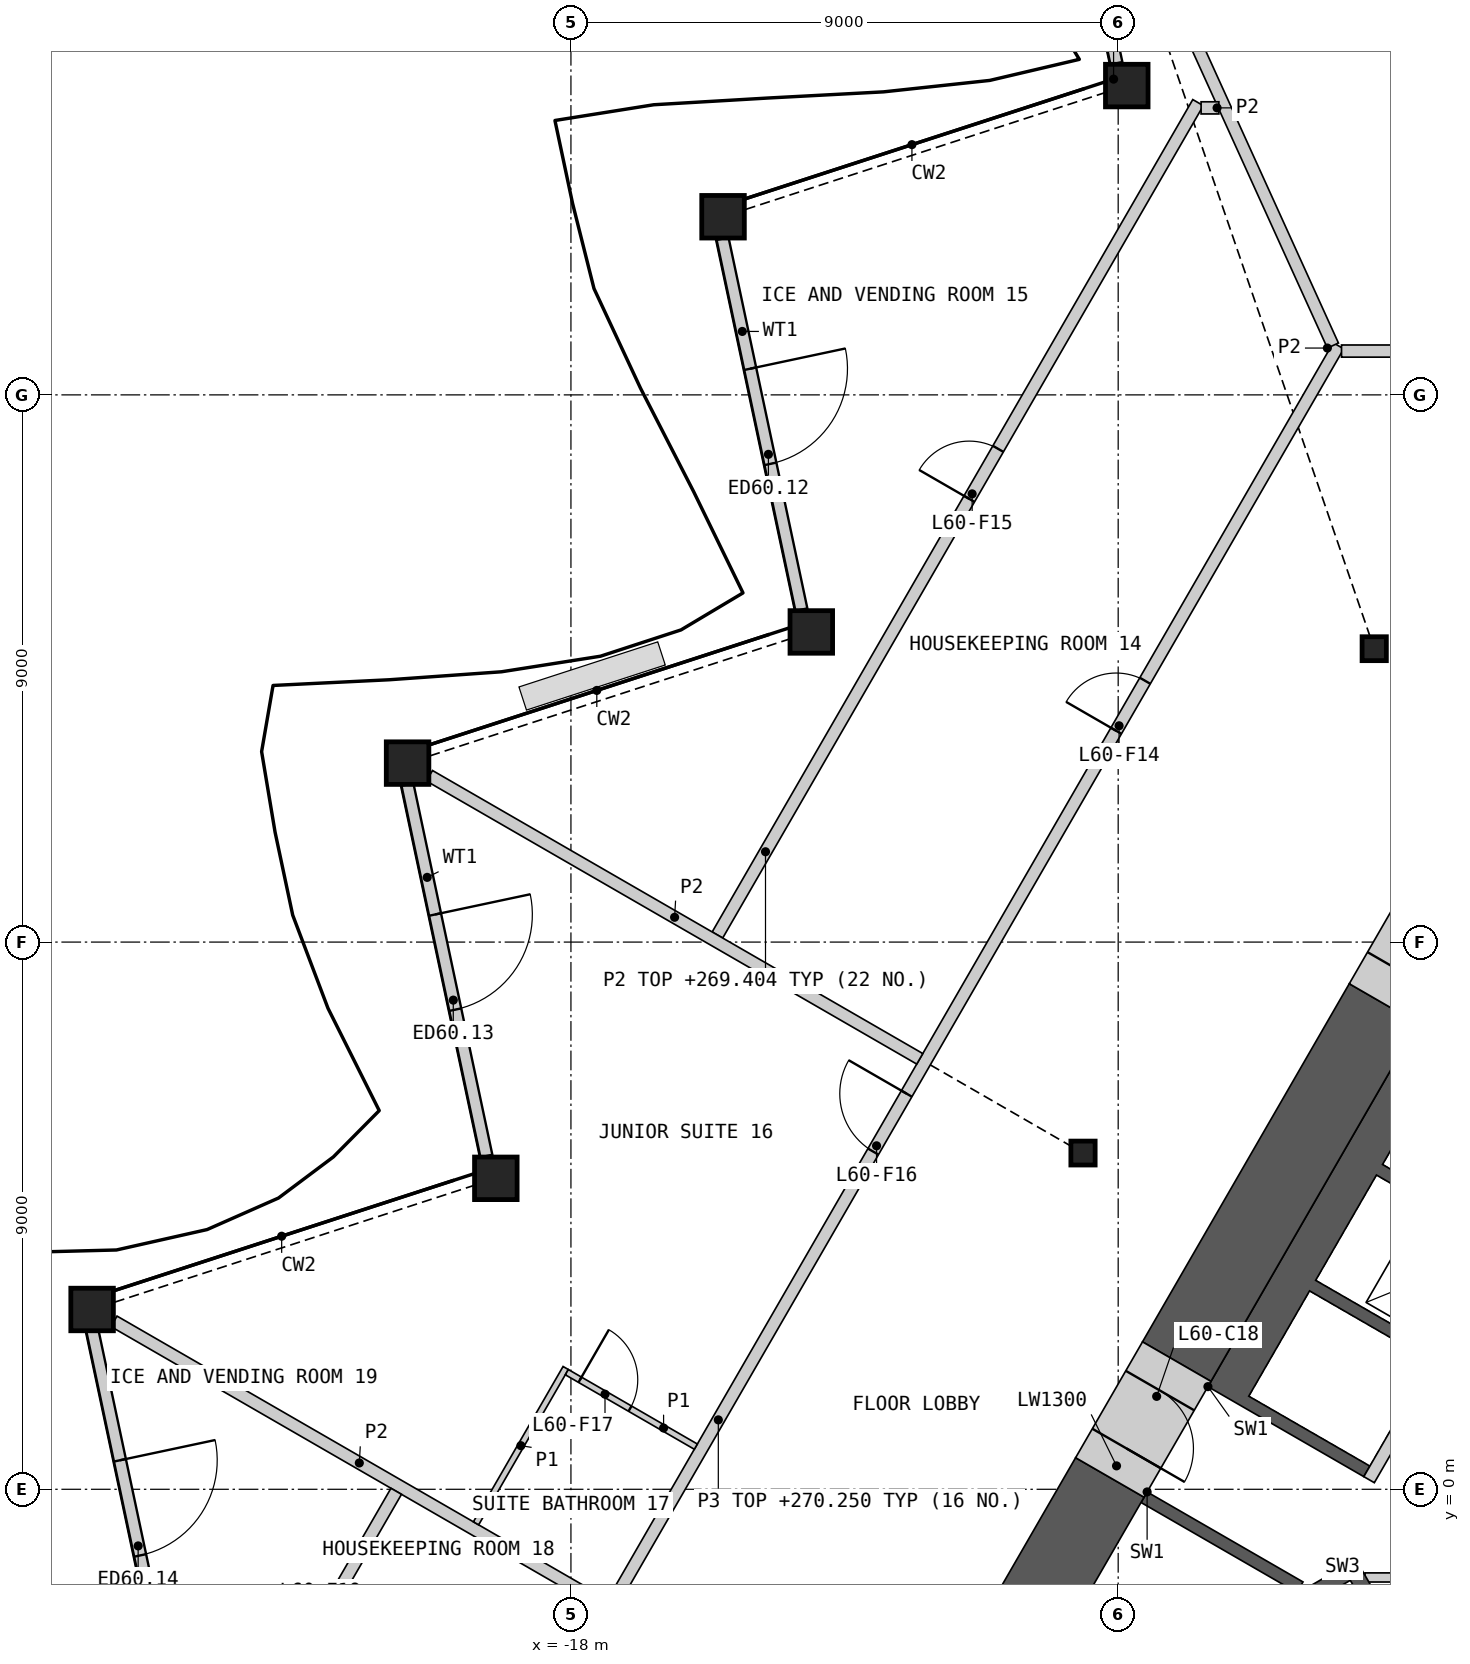
"""IFC4 building model, lengths in metres.
Left out: names, types, materials, properties, quantities, classifications, styles, units other than length and angle.
Written with IfcOpenShell. Run it as: python <this file> out.ifc"""

import sys

from ifc_helpers import new_model, si_unit, direction, frame, frame_2d, origin, origin_2d, place, context, subcontext, project, spatial, polyline, rectangle, hollow_rectangle, i_section, outline, extrude, element, fill, save


model = new_model("IFC4")
c1 = context("Model", 3, precision=1e-05, world=origin(), true_north=direction((0.0, 1.0)))
c2 = subcontext(c1, "Body", "Model", "MODEL_VIEW")
j1 = project(units=[si_unit("LENGTHUNIT", "METRE"), si_unit("PLANEANGLEUNIT", "RADIAN")], contexts=[c1])
p1 = place(None, origin())
s1 = spatial("IfcSite", under=j1, at=p1, CompositionType="ELEMENT")
p2 = place(p1, origin())
s2 = spatial("IfcBuilding", under=s1, at=p2, CompositionType="ELEMENT")
p3 = place(p2, frame((0.0, 0.0, 267.0)))
s3 = spatial("IfcBuildingStorey", under=s2, at=p3, CompositionType="ELEMENT", Elevation=267.0)
for number, where, z_axis, x_axis in (
    (1, (-8.859, 23.087, 0.0), (0.0, 0.0, 1.0), (1.0, 0.0, 0.0)),
    (2, (-15.499, 20.93, 0.0), (0.0, 0.0, 1.0), (1.0, 0.0, 0.0)),
    (3, (-14.047, 14.101, 0.0), (0.0, 0.0, 1.0), (1.0, 0.0, 0.0)),
    (4, (-20.687, 11.943, 0.0), (0.0, 0.0, 1.0), (1.0, 0.0, 0.0)),
    (5, (-19.235, 5.115, 0.0), (0.0, 0.0, 1.0), (1.0, 0.0, 0.0)),
    (6, (-25.875, 2.957, 0.0), (0.0, 0.0, 1.0), (1.0, 0.0, 0.0)),
):
    element("IfcColumn", number, at=place(p3, frame(where, z_axis=z_axis, x_axis=x_axis)), inside=s3, PredefinedType="COLUMN", context=c2, shape_type="SweptSolid", body=[
        extrude(hollow_rectangle(XDim=0.7, YDim=0.7, WallThickness=0.045, at=origin_2d()), origin(), (0.0, 0.0, 1.0), 3.6),
    ])
for number, where, z_axis, x_axis in (
    (7, (-4.789, 13.825, 0.0), (0.0, 0.0, 1.0), (1.0, 0.0, 0.0)),
    (8, (-9.578, 5.53, 0.0), (0.0, 0.0, 1.0), (1.0, 0.0, 0.0)),
):
    element("IfcColumn", number, at=place(p3, frame(where, z_axis=z_axis, x_axis=x_axis)), inside=s3, PredefinedType="COLUMN", context=c2, shape_type="SweptSolid", body=[
        extrude(i_section(OverallWidth=0.399, OverallDepth=0.393, WebThickness=0.023, FlangeThickness=0.037, at=origin_2d()), origin(), (0.0, 0.0, 1.0), 3.6),
    ])
p4 = place(p3, frame((-10.324, 29.545, 0.0), z_axis=(0.0, 0.0, 1.0), x_axis=(0.207930490886, -0.978143604467, 0.0)))
e9 = element("IfcWall", 9, at=p4, inside=s3, PredefinedType="SOLIDWALL", context=c2, shape_type="SweptSolid", body=[
    extrude(rectangle(XDim=6.228, YDim=0.2, at=frame_2d((3.114, 0.0))), origin(), (0.0, 0.0, 1.0), 2.404),
])
p5 = place(p4, frame((2.186, 0.0, 0.0)))
e10 = element("IfcOpeningElement", 10, at=p5, cuts=e9, PredefinedType="OPENING", context=c2, shape_type="SweptSolid", body=[
    extrude(rectangle(XDim=1.6, YDim=2.4, at=frame_2d((0.8, 1.2))), frame((0.0, 0.11, 0.0), z_axis=(0.0, -1.0, 0.0), x_axis=(1.0, 0.0, 0.0)), (0.0, 0.0, 1.0), 0.22),
])
p6 = place(p3, frame((-15.506, 20.569, 0.0), z_axis=(0.0, 0.0, 1.0), x_axis=(0.207911652145, -0.978147608954, 0.0)))
e11 = element("IfcWall", 11, at=p6, inside=s3, PredefinedType="SOLIDWALL", context=c2, shape_type="SweptSolid", body=[
    extrude(rectangle(XDim=6.238, YDim=0.2, at=frame_2d((3.119, 0.0))), origin(), (0.0, 0.0, 1.0), 2.701),
])
p7 = place(p6, frame((2.186, 0.0, 0.0)))
e12 = element("IfcOpeningElement", 12, at=p7, cuts=e11, PredefinedType="OPENING", context=c2, shape_type="SweptSolid", body=[
    extrude(rectangle(XDim=1.6, YDim=2.4, at=frame_2d((0.8, 1.2))), frame((0.0, 0.11, 0.0), z_axis=(0.0, -1.0, 0.0), x_axis=(1.0, 0.0, 0.0)), (0.0, 0.0, 1.0), 0.22),
])
p8 = place(p3, frame((-20.689, 11.592, 0.0), z_axis=(0.0, 0.0, 1.0), x_axis=(0.207900820141, -0.978149911304, 0.0)))
e13 = element("IfcWall", 13, at=p8, inside=s3, PredefinedType="SOLIDWALL", context=c2, shape_type="SweptSolid", body=[
    extrude(rectangle(XDim=6.247, YDim=0.2, at=frame_2d((3.124, 0.0))), origin(), (0.0, 0.0, 1.0), 2.701),
])
p9 = place(p8, frame((2.186, 0.0, 0.0)))
e14 = element("IfcOpeningElement", 14, at=p9, cuts=e13, PredefinedType="OPENING", context=c2, shape_type="SweptSolid", body=[
    extrude(rectangle(XDim=1.6, YDim=2.4, at=frame_2d((0.8, 1.2))), frame((0.0, 0.11, 0.0), z_axis=(0.0, -1.0, 0.0), x_axis=(1.0, 0.0, 0.0)), (0.0, 0.0, 1.0), 0.22),
])
p10 = place(p3, frame((-25.872, 2.615, 0.0), z_axis=(0.0, 0.0, 1.0), x_axis=(0.207882087744, -0.978153892593, 0.0)))
e15 = element("IfcWall", 15, at=p10, inside=s3, PredefinedType="SOLIDWALL", context=c2, shape_type="SweptSolid", body=[
    extrude(rectangle(XDim=6.257, YDim=0.2, at=frame_2d((3.129, 0.0))), origin(), (0.0, 0.0, 1.0), 2.701),
])
p11 = place(p10, frame((2.186, 0.0, 0.0)))
e16 = element("IfcOpeningElement", 16, at=p11, cuts=e15, PredefinedType="OPENING", context=c2, shape_type="SweptSolid", body=[
    extrude(rectangle(XDim=1.6, YDim=2.4, at=frame_2d((0.8, 1.2))), frame((0.0, 0.11, 0.0), z_axis=(0.0, -1.0, 0.0), x_axis=(1.0, 0.0, 0.0)), (0.0, 0.0, 1.0), 0.22),
])
p12 = place(p3, origin())
e17 = element("IfcWall", 17, at=p12, inside=s3, PredefinedType="SHEAR", context=c2, shape_type="SweptSolid", body=[
    extrude(outline(polyline([(-7.524, 1.688), (-4.124, 7.577), (-3.731, 7.35), (-1.561, 6.097), (-1.66, 5.924), (-3.652, 7.074), (-4.652, 5.342), (-2.66, 4.192), (-2.76, 4.019), (-4.752, 5.169), (-5.752, 3.437), (-3.76, 2.287), (-3.861, 2.113), (-5.852, 3.263), (-6.852, 1.531), (-4.861, 0.381), (-4.96, 0.208), (-7.131, 1.461), (-7.524, 1.688)])), origin(), (0.0, 0.0, 1.0), 3.25),
])
p13 = place(p3, origin())
e18 = element("IfcWall", 18, at=p13, inside=s3, PredefinedType="SHEAR", context=c2, shape_type="SweptSolid", body=[
    extrude(outline(polyline([(-8.524, -0.044), (-8.131, -0.271), (-5.96, -1.524), (-6.061, -1.697), (-8.231, -0.444), (-8.624, -0.217), (-8.524, -0.044)])), origin(), (0.0, 0.0, 1.0), 3.25),
])
p14 = place(p3, frame((-1.631, 5.776, 0.0), z_axis=(0.0, 0.0, 1.0), x_axis=(-0.499992876559, -0.866029516466, 0.0)))
e19 = element("IfcWall", 19, at=p14, inside=s3, PredefinedType="SOLIDWALL", context=c2, shape_type="SweptSolid", body=[
    extrude(rectangle(XDim=6.486, YDim=0.2, at=frame_2d((3.243, 0.0))), origin(), (0.0, 0.0, 1.0), 3.25),
])
p15 = place(p14, frame((0.337, 0.0, 0.0)))
e20 = element("IfcOpeningElement", 20, at=p15, cuts=e19, PredefinedType="OPENING", context=c2, shape_type="SweptSolid", body=[
    extrude(rectangle(XDim=1.1, YDim=2.1, at=frame_2d((0.55, 1.05))), frame((0.0, 0.11, 0.0), z_axis=(0.0, -1.0, 0.0), x_axis=(1.0, 0.0, 0.0)), (0.0, 0.0, 1.0), 0.22),
])
p16 = place(p14, frame((2.537, 0.0, 0.0)))
e21 = element("IfcOpeningElement", 21, at=p16, cuts=e19, PredefinedType="OPENING", context=c2, shape_type="SweptSolid", body=[
    extrude(rectangle(XDim=1.1, YDim=2.1, at=frame_2d((0.55, 1.05))), frame((0.0, 0.11, 0.0), z_axis=(0.0, -1.0, 0.0), x_axis=(1.0, 0.0, 0.0)), (0.0, 0.0, 1.0), 0.22),
])
p17 = place(p3, frame((-4.941, -1.45, 0.0), z_axis=(0.0, 0.0, 1.0), x_axis=(1.0, 0.0, 0.0)))
e22 = element("IfcWall", 22, at=p17, inside=s3, PredefinedType="PARTITIONING", context=c2, shape_type="SweptSolid", body=[
    extrude(rectangle(XDim=9.882, YDim=0.15, at=frame_2d((4.941, 0.0))), origin(), (0.0, 0.0, 1.0), 3.25),
])
p18 = place(p17, frame((4.391, 0.0, 0.0)))
e23 = element("IfcOpeningElement", 23, at=p18, cuts=e22, PredefinedType="OPENING", context=c2, shape_type="SweptSolid", body=[
    extrude(rectangle(XDim=1.1, YDim=2.1, at=frame_2d((0.55, 1.05))), frame((0.0, 0.085, 0.0), z_axis=(0.0, -1.0, 0.0), x_axis=(1.0, 0.0, 0.0)), (0.0, 0.0, 1.0), 0.17),
])
p19 = place(p3, origin())
e24 = element("IfcWall", 24, at=p19, inside=s3, PredefinedType="SHEAR", context=c2, shape_type="SweptSolid", body=[
    extrude(outline(polyline([(-5.307, -1.281), (-10.374, -4.206), (-10.032, -4.298), (-5.182, -1.498), (-5.307, -1.281)])), origin(), (0.0, 0.0, 1.0), 3.25),
])
p20 = place(p3, frame((-5.199, -1.219, 0.0), z_axis=(0.0, 0.0, 1.0), x_axis=(0.499982516597, -0.866035497597, 0.0)))
e25 = element("IfcWall", 25, at=p20, inside=s3, PredefinedType="SHEAR", context=c2, shape_type="SweptSolid", body=[
    extrude(rectangle(XDim=3.088, YDim=0.25, at=frame_2d((1.544, 0.0))), origin(), (0.0, 0.0, 1.0), 3.25),
])
p21 = place(p20, frame((0.994, 0.0, 0.0)))
e26 = element("IfcOpeningElement", 26, at=p21, cuts=e25, PredefinedType="OPENING", context=c2, shape_type="SweptSolid", body=[
    extrude(rectangle(XDim=1.1, YDim=2.1, at=frame_2d((0.55, 1.05))), frame((0.0, 0.135, 0.0), z_axis=(0.0, -1.0, 0.0), x_axis=(1.0, 0.0, 0.0)), (0.0, 0.0, 1.0), 0.27),
])
p22 = place(p3, frame((-4.636, 7.99, 0.0), z_axis=(0.0, 0.0, 1.0), x_axis=(-0.500022813292, -0.866012232124, 0.0)))
e27 = element("IfcWall", 27, at=p22, inside=s3, PredefinedType="SHEAR", context=c2, shape_type="SweptSolid", body=[
    extrude(rectangle(XDim=6.802, YDim=1.3, at=frame_2d((3.401, 0.0))), origin(), (0.0, 0.0, 1.0), 3.25),
])
p23 = place(p3, frame((-9.137, 0.195, 0.0), z_axis=(0.0, 0.0, 1.0), x_axis=(-0.499985697398, -0.866033661238, 0.0)))
e28 = element("IfcWall", 28, at=p23, inside=s3, PredefinedType="SHEAR", context=c2, shape_type="SweptSolid", body=[
    extrude(rectangle(XDim=4.362, YDim=1.3, at=frame_2d((2.181, 0.0))), origin(), (0.0, 0.0, 1.0), 3.25),
])
p24 = place(p3, frame((-3.536, 9.896, 0.0), z_axis=(0.0, 0.0, 1.0), x_axis=(-0.499981787252, -0.866035918664, 0.0)))
e29 = element("IfcWall", 29, at=p24, inside=s3, PredefinedType="SHEAR", context=c2, shape_type="SweptSolid", body=[
    extrude(rectangle(XDim=2.2, YDim=1.3, at=frame_2d((1.1, 0.0))), origin(), (0.0, 0.0, 1.0), 3.25),
])
p25 = place(p24, frame((0.6, 0.0, 0.0)))
e30 = element("IfcOpeningElement", 30, at=p25, cuts=e29, PredefinedType="OPENING", context=c2, shape_type="SweptSolid", body=[
    extrude(rectangle(XDim=1.0, YDim=2.1, at=frame_2d((0.5, 1.05))), frame((0.0, 0.66, 0.0), z_axis=(0.0, -1.0, 0.0), x_axis=(1.0, 0.0, 0.0)), (0.0, 0.0, 1.0), 1.32),
])
p26 = place(p3, frame((-8.037, 2.1, 0.0), z_axis=(0.0, 0.0, 1.0), x_axis=(-0.50002983664, -0.866008176907, 0.0)))
e31 = element("IfcWall", 31, at=p26, inside=s3, PredefinedType="SHEAR", context=c2, shape_type="SweptSolid", body=[
    extrude(rectangle(XDim=2.2, YDim=1.3, at=frame_2d((1.1, 0.0))), origin(), (0.0, 0.0, 1.0), 3.25),
])
p27 = place(p26, frame((0.55, 0.0, 0.0)))
e32 = element("IfcOpeningElement", 32, at=p27, cuts=e31, PredefinedType="OPENING", context=c2, shape_type="SweptSolid", body=[
    extrude(rectangle(XDim=1.1, YDim=2.1, at=frame_2d((0.55, 1.05))), frame((0.0, 0.66, 0.0), z_axis=(0.0, -1.0, 0.0), x_axis=(1.0, 0.0, 0.0)), (0.0, 0.0, 1.0), 1.32),
])
p28 = place(p3, frame((-18.976, -4.747, 0.0), z_axis=(0.0, 0.0, 1.0), x_axis=(0.499999852422, 0.866025488988, 0.0)))
e33 = element("IfcWall", 33, at=p28, inside=s3, PredefinedType="PARTITIONING", context=c2, shape_type="SweptSolid", body=[
    extrude(rectangle(XDim=27.198, YDim=0.2, at=frame_2d((13.599, 0.0))), origin(), (0.0, 0.0, 1.0), 3.25),
])
p29 = place(p28, frame((19.886, 0.0, 0.0)))
e34 = element("IfcOpeningElement", 34, at=p29, cuts=e33, PredefinedType="OPENING", context=c2, shape_type="SweptSolid", body=[
    extrude(rectangle(XDim=0.95, YDim=2.1, at=frame_2d((0.475, 1.05))), frame((0.0, 0.11, 0.0), z_axis=(0.0, -1.0, 0.0), x_axis=(1.0, 0.0, 0.0)), (0.0, 0.0, 1.0), 0.22),
])
p30 = place(p28, frame((11.895, 0.0, 0.0)))
e35 = element("IfcOpeningElement", 35, at=p30, cuts=e33, PredefinedType="OPENING", context=c2, shape_type="SweptSolid", body=[
    extrude(rectangle(XDim=1.1, YDim=2.1, at=frame_2d((0.55, 1.05))), frame((0.0, 0.11, 0.0), z_axis=(0.0, -1.0, 0.0), x_axis=(1.0, 0.0, 0.0)), (0.0, 0.0, 1.0), 0.22),
])
p31 = place(p28, frame((1.152, 0.0, 0.0)))
e36 = element("IfcOpeningElement", 36, at=p31, cuts=e33, PredefinedType="OPENING", context=c2, shape_type="SweptSolid", body=[
    extrude(rectangle(XDim=0.95, YDim=2.1, at=frame_2d((0.475, 1.05))), frame((0.0, 0.11, 0.0), z_axis=(0.0, -1.0, 0.0), x_axis=(1.0, 0.0, 0.0)), (0.0, 0.0, 1.0), 0.22),
])
p32 = place(p3, frame((-5.327, 18.72, 0.0), z_axis=(0.0, 0.0, 1.0), x_axis=(1.0, 0.0, 0.0)))
e37 = element("IfcWall", 37, at=p32, inside=s3, PredefinedType="PARTITIONING", context=c2, shape_type="SweptSolid", body=[
    extrude(rectangle(XDim=3.002, YDim=0.2, at=frame_2d((1.501, 0.0))), origin(), (0.0, 0.0, 1.0), 3.25),
])
p33 = place(p3, frame((-15.591, 9.117, 0.0), z_axis=(0.0, 0.0, 1.0), x_axis=(0.499994281579, 0.866028705291, 0.0)))
e38 = element("IfcWall", 38, at=p33, inside=s3, PredefinedType="PARTITIONING", context=c2, shape_type="SweptSolid", body=[
    extrude(rectangle(XDim=15.808, YDim=0.2, at=frame_2d((7.904, 0.0))), origin(), (0.0, 0.0, 1.0), 2.404),
])
p34 = place(p33, frame((8.283, 0.0, 0.0)))
e39 = element("IfcOpeningElement", 39, at=p34, cuts=e38, PredefinedType="OPENING", context=c2, shape_type="SweptSolid", body=[
    extrude(rectangle(XDim=0.95, YDim=2.1, at=frame_2d((0.475, 1.05))), frame((0.0, 0.11, 0.0), z_axis=(0.0, -1.0, 0.0), x_axis=(1.0, 0.0, 0.0)), (0.0, 0.0, 1.0), 0.22),
])
p35 = place(p3, origin())
e40 = element("IfcWall", 40, at=p35, inside=s3, PredefinedType="PARTITIONING", context=c2, shape_type="SweptSolid", body=[
    extrude(outline(polyline([(-5.56, 18.77), (-10.017, 28.582), (-10.21, 29.491), (-5.377, 18.853), (-5.56, 18.77)])), origin(), (0.0, 0.0, 1.0), 2.404),
])
p36 = place(p3, frame((-25.515, 2.762, 0.0), z_axis=(0.0, 0.0, 1.0), x_axis=(0.866025446298, -0.499999926364, 0.0)))
e41 = element("IfcWall", 41, at=p36, inside=s3, PredefinedType="PARTITIONING", context=c2, shape_type="SweptSolid", body=[
    extrude(rectangle(XDim=9.317, YDim=0.2, at=frame_2d((4.659, 0.0))), origin(), (0.0, 0.0, 1.0), 2.404),
])
p37 = place(p3, frame((-20.327, 11.736, 0.0), z_axis=(0.0, 0.0, 1.0), x_axis=(0.866022277917, -0.500005414122, 0.0)))
e42 = element("IfcWall", 42, at=p37, inside=s3, PredefinedType="PARTITIONING", context=c2, shape_type="SweptSolid", body=[
    extrude(rectangle(XDim=9.311, YDim=0.2, at=frame_2d((4.656, 0.0))), origin(), (0.0, 0.0, 1.0), 2.404),
])
p38 = place(p3, frame((-23.595, -4.747, 0.0), z_axis=(0.0, 0.0, 1.0), x_axis=(0.500003308737, 0.866023493476, 0.0)))
e43 = element("IfcWall", 43, at=p38, inside=s3, PredefinedType="PARTITIONING", context=c2, shape_type="SweptSolid", body=[
    extrude(rectangle(XDim=5.443, YDim=0.2, at=frame_2d((2.721, 0.0))), origin(), (0.0, 0.0, 1.0), 2.404),
])
p39 = place(p38, frame((2.093, 0.0, 0.0)))
e44 = element("IfcOpeningElement", 44, at=p39, cuts=e43, PredefinedType="OPENING", context=c2, shape_type="SweptSolid", body=[
    extrude(rectangle(XDim=0.95, YDim=2.1, at=frame_2d((0.475, 1.05))), frame((0.0, 0.11, 0.0), z_axis=(0.0, -1.0, 0.0), x_axis=(1.0, 0.0, 0.0)), (0.0, 0.0, 1.0), 0.22),
])
p40 = place(p3, frame((-7.636, 22.72, 0.0), z_axis=(0.0, 0.0, 1.0), x_axis=(1.0, 0.0, 0.0)))
e45 = element("IfcWall", 45, at=p40, inside=s3, PredefinedType="PARTITIONING", context=c2, shape_type="SweptSolid", body=[
    extrude(rectangle(XDim=0.292, YDim=0.2, at=frame_2d((0.146, 0.0))), origin(), (0.0, 0.0, 1.0), 2.404),
])
p41 = place(p3, frame((-19.561, -0.56, 0.0), z_axis=(0.0, 0.0, 1.0), x_axis=(0.49997559174, 0.866039495442, 0.0)))
e46 = element("IfcWall", 46, at=p41, inside=s3, PredefinedType="PARTITIONING", context=c2, shape_type="SweptSolid", body=[
    extrude(rectangle(XDim=2.95, YDim=0.1, at=frame_2d((1.475, 0.0))), origin(), (0.0, 0.0, 1.0), 2.404),
])
p42 = place(p3, frame((-18.068, 1.927, 0.0), z_axis=(0.0, 0.0, 1.0), x_axis=(0.866014668023, -0.500018594424, 0.0)))
e47 = element("IfcWall", 47, at=p42, inside=s3, PredefinedType="PARTITIONING", context=c2, shape_type="SweptSolid", body=[
    extrude(rectangle(XDim=2.45, YDim=0.1, at=frame_2d((1.225, 0.0))), origin(), (0.0, 0.0, 1.0), 2.404),
])
p43 = place(p42, frame((0.25, 0.0, 0.0)))
e48 = element("IfcOpeningElement", 48, at=p43, cuts=e47, PredefinedType="OPENING", context=c2, shape_type="SweptSolid", body=[
    extrude(rectangle(XDim=0.95, YDim=2.1, at=frame_2d((0.475, 1.05))), frame((0.0, 0.06, 0.0), z_axis=(0.0, -1.0, 0.0), x_axis=(1.0, 0.0, 0.0)), (0.0, 0.0, 1.0), 0.12),
])
p44 = place(p7, origin())
e49 = element("IfcDoor", 49, at=p44, inside=s3, OperationType="DOUBLE_DOOR_SINGLE_SWING", PredefinedType="DOOR", context=c2, shape_type="SweptSolid", body=[
    extrude(rectangle(XDim=1.6, YDim=2.4, at=frame_2d((0.8, 1.2))), frame((0.0, 0.025, 0.0), z_axis=(0.0, -1.0, 0.0), x_axis=(1.0, 0.0, 0.0)), (0.0, 0.0, 1.0), 0.05),
])
fill(e12, e49)
p45 = place(p9, origin())
e50 = element("IfcDoor", 50, at=p45, inside=s3, OperationType="DOUBLE_DOOR_SINGLE_SWING", PredefinedType="DOOR", context=c2, shape_type="SweptSolid", body=[
    extrude(rectangle(XDim=1.6, YDim=2.4, at=frame_2d((0.8, 1.2))), frame((0.0, 0.025, 0.0), z_axis=(0.0, -1.0, 0.0), x_axis=(1.0, 0.0, 0.0)), (0.0, 0.0, 1.0), 0.05),
])
fill(e14, e50)
p46 = place(p11, origin())
e51 = element("IfcDoor", 51, at=p46, inside=s3, OperationType="DOUBLE_DOOR_SINGLE_SWING", PredefinedType="DOOR", context=c2, shape_type="SweptSolid", body=[
    extrude(rectangle(XDim=1.6, YDim=2.4, at=frame_2d((0.8, 1.2))), frame((0.0, 0.025, 0.0), z_axis=(0.0, -1.0, 0.0), x_axis=(1.0, 0.0, 0.0)), (0.0, 0.0, 1.0), 0.05),
])
fill(e16, e51)
p47 = place(p27, origin())
e52 = element("IfcDoor", 52, at=p47, inside=s3, OperationType="SINGLE_SWING_RIGHT", PredefinedType="DOOR", context=c2, shape_type="SweptSolid", body=[
    extrude(rectangle(XDim=1.1, YDim=2.1, at=frame_2d((0.55, 1.05))), frame((0.0, 0.405, 0.0), z_axis=(0.0, -1.0, 0.0), x_axis=(1.0, 0.0, 0.0)), (0.0, 0.0, 1.0), 0.05),
])
fill(e32, e52)
p48 = place(p29, origin())
e53 = element("IfcDoor", 53, at=p48, inside=s3, OperationType="SINGLE_SWING_LEFT", PredefinedType="DOOR", context=c2, shape_type="SweptSolid", body=[
    extrude(rectangle(XDim=0.95, YDim=2.1, at=frame_2d((0.475, 1.05))), frame((0.0, 0.025, 0.0), z_axis=(0.0, -1.0, 0.0), x_axis=(1.0, 0.0, 0.0)), (0.0, 0.0, 1.0), 0.05),
])
fill(e34, e53)
p49 = place(p34, origin())
e54 = element("IfcDoor", 54, at=p49, inside=s3, OperationType="SINGLE_SWING_LEFT", PredefinedType="DOOR", context=c2, shape_type="SweptSolid", body=[
    extrude(rectangle(XDim=0.95, YDim=2.1, at=frame_2d((0.475, 1.05))), frame((0.0, 0.025, 0.0), z_axis=(0.0, -1.0, 0.0), x_axis=(1.0, 0.0, 0.0)), (0.0, 0.0, 1.0), 0.05),
])
fill(e39, e54)
p50 = place(p30, origin())
e55 = element("IfcDoor", 55, at=p50, inside=s3, OperationType="SINGLE_SWING_RIGHT", PredefinedType="DOOR", context=c2, shape_type="SweptSolid", body=[
    extrude(rectangle(XDim=1.1, YDim=2.1, at=frame_2d((0.55, 1.05))), frame((0.0, 0.025, 0.0), z_axis=(0.0, -1.0, 0.0), x_axis=(1.0, 0.0, 0.0)), (0.0, 0.0, 1.0), 0.05),
])
fill(e35, e55)
p51 = place(p43, origin())
e56 = element("IfcDoor", 56, at=p51, inside=s3, OperationType="SINGLE_SWING_LEFT", PredefinedType="DOOR", context=c2, shape_type="SweptSolid", body=[
    extrude(rectangle(XDim=0.95, YDim=2.1, at=frame_2d((0.475, 1.05))), frame((0.0, 0.025, 0.0), z_axis=(0.0, -1.0, 0.0), x_axis=(1.0, 0.0, 0.0)), (0.0, 0.0, 1.0), 0.05),
])
fill(e48, e56)
save(model, sys.argv[1])
